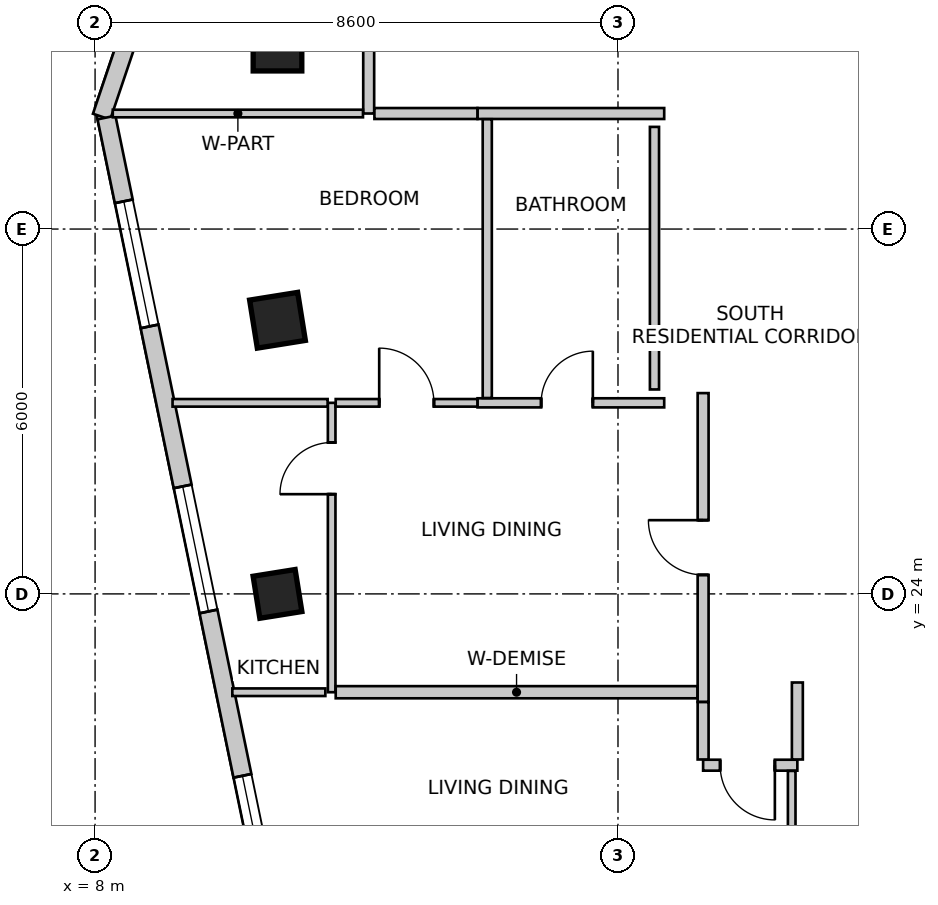
"""IFC4 building model, lengths in metres.
Left out: names, types, materials, properties, quantities, classifications, styles, units other than length and angle.
Written with IfcOpenShell. Run it as: python <this file> out.ifc"""

import sys

from ifc_helpers import new_model, si_unit, direction, frame, frame_2d, origin, origin_2d, place, context, subcontext, project, spatial, rectangle, extrude, source, transform, mapped, element, fill, save


model = new_model("IFC4")
c1 = context("Model", 3, precision=1e-05, world=origin(), true_north=direction((0.0, 1.0)))
c2 = subcontext(c1, "Body", "Model", "MODEL_VIEW")
j1 = project(units=[si_unit("LENGTHUNIT", "METRE"), si_unit("PLANEANGLEUNIT", "RADIAN")], contexts=[c1])
p1 = place(None, origin())
s1 = spatial("IfcSite", under=j1, at=p1, CompositionType="ELEMENT")
p2 = place(p1, origin())
s2 = spatial("IfcBuilding", under=s1, at=p2, CompositionType="ELEMENT")
p3 = place(p2, frame((0.0, 0.0, 214.9)))
s3 = spatial("IfcBuildingStorey", under=s2, at=p3, CompositionType="ELEMENT", Elevation=214.9)
m1 = source(origin(), c2, "Body", "SweptSolid", [
    extrude(rectangle(XDim=0.8, YDim=0.8, at=origin_2d()), origin(), (0.0, 0.0, 1.0), 3.5),
])
for number, where, z_axis, x_axis in (
    (1, (11.0, 33.0, 0.0), (0.0, 0.0, 1.0), (1.0, 0.0, 0.0)),
    (2, (11.0, 28.5, 0.0), (0.0, 0.0, 1.0), (0.158, -0.987, 0.0)),
):
    element("IfcColumn", number, at=place(p3, frame(where, z_axis=z_axis, x_axis=x_axis)), inside=s3, PredefinedType="COLUMN", context=c2, shape_type="MappedRepresentation", body=[
        mapped(m1, transform((0.0, 0.0, 0.0), scale=1.0)),
    ])
m2 = source(origin(), c2, "Body", "SweptSolid", [
    extrude(rectangle(XDim=0.7, YDim=0.7, at=origin_2d()), origin(), (0.0, 0.0, 1.0), 3.5),
])
p4 = place(p3, frame((11.0, 24.0, 0.0), z_axis=(0.0, 0.0, 1.0), x_axis=(0.158158067254, -0.987413806751, 0.0)))
e3 = element("IfcColumn", 3, at=p4, inside=s3, PredefinedType="COLUMN", context=c2, shape_type="MappedRepresentation", body=[
    mapped(m2, transform((0.0, 0.0, 0.0), scale=1.0)),
])
p5 = place(p3, frame((13.269, 47.134, 0.0), z_axis=(0.0, 0.0, 1.0), x_axis=(-0.319920776449, -0.947444297464, 0.0)))
e4 = element("IfcWall", 4, at=p5, inside=s3, PredefinedType="SOLIDWALL", context=c2, shape_type="SweptSolid", body=[
    extrude(rectangle(XDim=16.133, YDim=0.3, at=frame_2d((8.067, 0.0))), origin(), (0.0, 0.0, 1.0), 3.25),
])
m3 = source(origin(), c2, "Body", "SweptSolid", [
    extrude(rectangle(XDim=2.4, YDim=2.2, at=frame_2d((1.2, 1.1))), frame((0.0, 0.16, 0.0), z_axis=(0.0, -1.0, 0.0), x_axis=(1.0, 0.0, 0.0)), (0.0, 0.0, 1.0), 0.32),
])
p6 = place(p5, frame((2.363, 0.0, 0.85)))
e5 = element("IfcOpeningElement", 5, at=p6, cuts=e4, PredefinedType="OPENING", context=c2, shape_type="MappedRepresentation", body=[
    mapped(m3, transform((0.0, 0.0, 0.0), scale=1.0)),
])
m4 = source(origin(), c2, "Body", "SweptSolid", [
    extrude(rectangle(XDim=2.1, YDim=2.0, at=frame_2d((1.05, 1.0))), frame((0.0, 0.16, 0.0), z_axis=(0.0, -1.0, 0.0), x_axis=(1.0, 0.0, 0.0)), (0.0, 0.0, 1.0), 0.32),
])
p7 = place(p5, frame((7.41, 0.0, 0.85)))
e6 = element("IfcOpeningElement", 6, at=p7, cuts=e4, PredefinedType="OPENING", context=c2, shape_type="MappedRepresentation", body=[
    mapped(m4, transform((0.0, 0.0, 0.0), scale=1.0)),
])
p8 = place(p5, frame((12.157, 0.0, 0.85)))
e7 = element("IfcOpeningElement", 7, at=p8, cuts=e4, PredefinedType="OPENING", context=c2, shape_type="MappedRepresentation", body=[
    mapped(m3, transform((0.0, 0.0, 0.0), scale=1.0)),
])
p9 = place(p3, frame((8.188, 31.834, 0.0), z_axis=(0.0, 0.0, 1.0), x_axis=(0.202303475707, -0.979322880217, 0.0)))
e8 = element("IfcWall", 8, at=p9, inside=s3, PredefinedType="SOLIDWALL", context=c2, shape_type="SweptSolid", body=[
    extrude(rectangle(XDim=15.766, YDim=0.3, at=frame_2d((7.883, 0.0))), origin(), (0.0, 0.0, 1.0), 3.25),
])
p10 = place(p9, frame((1.407, 0.0, 0.85)))
e9 = element("IfcOpeningElement", 9, at=p10, cuts=e8, PredefinedType="OPENING", context=c2, shape_type="MappedRepresentation", body=[
    mapped(m4, transform((0.0, 0.0, 0.0), scale=1.0)),
])
p11 = place(p9, frame((6.194, 0.0, 0.85)))
e10 = element("IfcOpeningElement", 10, at=p11, cuts=e8, PredefinedType="OPENING", context=c2, shape_type="MappedRepresentation", body=[
    mapped(m4, transform((0.0, 0.0, 0.0), scale=1.0)),
])
p12 = place(p9, frame((11.054, 0.0, 0.85)))
e11 = element("IfcOpeningElement", 11, at=p12, cuts=e8, PredefinedType="OPENING", context=c2, shape_type="MappedRepresentation", body=[
    mapped(m4, transform((0.0, 0.0, 0.0), scale=1.0)),
])
p13 = place(p3, frame((12.5, 31.9, 0.0), z_axis=(0.0, 0.0, 1.0), x_axis=(0.0, 1.0, 0.0)))
e12 = element("IfcWall", 12, at=p13, inside=s3, PredefinedType="PARTITIONING", context=c2, shape_type="SweptSolid", body=[
    extrude(rectangle(XDim=1.556, YDim=0.18, at=frame_2d((0.778, 0.0))), origin(), (0.0, 0.0, 1.0), 2.835),
])
p14 = place(p3, frame((17.36, 31.9, 0.0), z_axis=(0.0, 0.0, 1.0), x_axis=(-1.0, 0.0, 0.0)))
e13 = element("IfcWall", 13, at=p14, inside=s3, PredefinedType="PARTITIONING", context=c2, shape_type="SweptSolid", body=[
    extrude(rectangle(XDim=3.07, YDim=0.18, at=frame_2d((1.535, 0.0))), origin(), (0.0, 0.0, 1.0), 2.835),
])
p15 = place(p3, frame((14.288, 31.9, 0.0), z_axis=(0.0, 0.0, 1.0), x_axis=(-1.0, 0.0, 0.0)))
e14 = element("IfcWall", 14, at=p15, inside=s3, PredefinedType="PARTITIONING", context=c2, shape_type="SweptSolid", body=[
    extrude(rectangle(XDim=1.694, YDim=0.18, at=frame_2d((0.847, 0.0))), origin(), (0.0, 0.0, 1.0), 2.835),
])
p16 = place(p3, frame((12.406, 31.9, 0.0), z_axis=(0.0, 0.0, 1.0), x_axis=(-1.0, 0.0, 0.0)))
e15 = element("IfcWall", 15, at=p16, inside=s3, PredefinedType="PARTITIONING", context=c2, shape_type="SweptSolid", body=[
    extrude(rectangle(XDim=4.115, YDim=0.125, at=frame_2d((2.057, 0.0))), origin(), (0.0, 0.0, 1.0), 2.542),
])
p17 = place(p3, frame((18.0, 22.223, 0.0), z_axis=(0.0, 0.0, 1.0), x_axis=(0.0, 1.0, 0.0)))
e16 = element("IfcWall", 16, at=p17, inside=s3, PredefinedType="PARTITIONING", context=c2, shape_type="SweptSolid", body=[
    extrude(rectangle(XDim=5.079, YDim=0.18, at=frame_2d((2.54, 0.0))), origin(), (0.0, 0.0, 1.0), 2.688),
])
m5 = source(origin(), c2, "Body", "SweptSolid", [
    extrude(rectangle(XDim=0.9, YDim=2.15, at=frame_2d((0.45, 1.075))), frame((0.0, 0.1, 0.0), z_axis=(0.0, -1.0, 0.0), x_axis=(1.0, 0.0, 0.0)), (0.0, 0.0, 1.0), 0.2),
])
p18 = place(p17, frame((2.09, 0.0, 0.0)))
e17 = element("IfcOpeningElement", 17, at=p18, cuts=e16, PredefinedType="OPENING", context=c2, shape_type="MappedRepresentation", body=[
    mapped(m5, transform((0.0, 0.0, 0.0), scale=1.0)),
])
p19 = place(p3, frame((19.55, 21.183, 0.0), z_axis=(0.0, 0.0, 1.0), x_axis=(-1.0, 0.0, 0.0)))
e18 = element("IfcWall", 18, at=p19, inside=s3, PredefinedType="PARTITIONING", context=c2, shape_type="SweptSolid", body=[
    extrude(rectangle(XDim=1.55, YDim=0.18, at=frame_2d((0.775, 0.0))), origin(), (0.0, 0.0, 1.0), 2.688),
])
p20 = place(p19, frame((0.37, 0.0, 0.0)))
e19 = element("IfcOpeningElement", 19, at=p20, cuts=e18, PredefinedType="OPENING", context=c2, shape_type="MappedRepresentation", body=[
    mapped(m5, transform((0.0, 0.0, 0.0), scale=1.0)),
])
p21 = place(p3, frame((18.0, 21.277, 0.0), z_axis=(0.0, 0.0, 1.0), x_axis=(0.0, 1.0, 0.0)))
e20 = element("IfcWall", 20, at=p21, inside=s3, PredefinedType="PARTITIONING", context=c2, shape_type="SweptSolid", body=[
    extrude(rectangle(XDim=0.944, YDim=0.18, at=frame_2d((0.472, 0.0))), origin(), (0.0, 0.0, 1.0), 2.688),
])
p22 = place(p3, frame((19.55, 22.543, 0.0), z_axis=(0.0, 0.0, 1.0), x_axis=(0.0, -1.0, 0.0)))
e21 = element("IfcWall", 21, at=p22, inside=s3, PredefinedType="PARTITIONING", context=c2, shape_type="SweptSolid", body=[
    extrude(rectangle(XDim=1.266, YDim=0.18, at=frame_2d((0.633, 0.0))), origin(), (0.0, 0.0, 1.0), 3.25),
])
p23 = place(p3, frame((11.891, 22.383, 0.0), z_axis=(0.0, 0.0, 1.0), x_axis=(0.0, 1.0, 0.0)))
e22 = element("IfcWall", 22, at=p23, inside=s3, PredefinedType="PARTITIONING", context=c2, shape_type="SweptSolid", body=[
    extrude(rectangle(XDim=4.759, YDim=0.125, at=frame_2d((2.379, 0.0))), origin(), (0.0, 0.0, 1.0), 2.688),
])
m6 = source(origin(), c2, "Body", "SweptSolid", [
    extrude(rectangle(XDim=0.85, YDim=2.15, at=frame_2d((0.425, 1.075))), frame((0.0, 0.073, 0.0), z_axis=(0.0, -1.0, 0.0), x_axis=(1.0, 0.0, 0.0)), (0.0, 0.0, 1.0), 0.145),
])
p24 = place(p23, frame((3.257, 0.0, 0.0)))
e23 = element("IfcOpeningElement", 23, at=p24, cuts=e22, PredefinedType="OPENING", context=c2, shape_type="MappedRepresentation", body=[
    mapped(m6, transform((0.0, 0.0, 0.0), scale=1.0)),
])
p25 = place(p3, frame((14.29, 27.142, 0.0), z_axis=(0.0, 0.0, 1.0), x_axis=(1.0, 0.0, 0.0)))
e24 = element("IfcWall", 24, at=p25, inside=s3, PredefinedType="PARTITIONING", context=c2, shape_type="SweptSolid", body=[
    extrude(rectangle(XDim=3.07, YDim=0.15, at=frame_2d((1.535, 0.0))), origin(), (0.0, 0.0, 1.0), 2.835),
])
m7 = source(origin(), c2, "Body", "SweptSolid", [
    extrude(rectangle(XDim=0.85, YDim=2.15, at=frame_2d((0.425, 1.075))), frame((0.0, 0.085, 0.0), z_axis=(0.0, -1.0, 0.0), x_axis=(1.0, 0.0, 0.0)), (0.0, 0.0, 1.0), 0.17),
])
p26 = place(p25, frame((1.046, 0.0, 0.0)))
e25 = element("IfcOpeningElement", 25, at=p26, cuts=e24, PredefinedType="OPENING", context=c2, shape_type="MappedRepresentation", body=[
    mapped(m7, transform((0.0, 0.0, 0.0), scale=1.0)),
])
p27 = place(p3, frame((11.958, 27.142, 0.0), z_axis=(0.0, 0.0, 1.0), x_axis=(1.0, 0.0, 0.0)))
e26 = element("IfcWall", 26, at=p27, inside=s3, PredefinedType="PARTITIONING", context=c2, shape_type="SweptSolid", body=[
    extrude(rectangle(XDim=2.331, YDim=0.125, at=frame_2d((1.165, 0.0))), origin(), (0.0, 0.0, 1.0), 3.25),
])
m8 = source(origin(), c2, "Body", "SweptSolid", [
    extrude(rectangle(XDim=0.9, YDim=2.15, at=frame_2d((0.45, 1.075))), frame((0.0, 0.073, 0.0), z_axis=(0.0, -1.0, 0.0), x_axis=(1.0, 0.0, 0.0)), (0.0, 0.0, 1.0), 0.145),
])
p28 = place(p27, frame((0.715, 0.0, 0.0)))
e27 = element("IfcOpeningElement", 27, at=p28, cuts=e26, PredefinedType="OPENING", context=c2, shape_type="MappedRepresentation", body=[
    mapped(m8, transform((0.0, 0.0, 0.0), scale=1.0)),
])
p29 = place(p3, frame((17.906, 22.383, 0.0), z_axis=(0.0, 0.0, 1.0), x_axis=(-1.0, 0.0, 0.0)))
e28 = element("IfcWall", 28, at=p29, inside=s3, PredefinedType="PARTITIONING", context=c2, shape_type="SweptSolid", body=[
    extrude(rectangle(XDim=5.948, YDim=0.2, at=frame_2d((2.974, 0.0))), origin(), (0.0, 0.0, 1.0), 2.688),
])
p30 = place(p3, frame((9.274, 27.142, 0.0), z_axis=(0.0, 0.0, 1.0), x_axis=(1.0, 0.0, 0.0)))
e29 = element("IfcWall", 29, at=p30, inside=s3, PredefinedType="PARTITIONING", context=c2, shape_type="SweptSolid", body=[
    extrude(rectangle(XDim=2.55, YDim=0.125, at=frame_2d((1.275, 0.0))), origin(), (0.0, 0.0, 1.0), 2.542),
])
p31 = place(p3, frame((11.787, 22.383, 0.0), z_axis=(0.0, 0.0, 1.0), x_axis=(-1.0, 0.0, 0.0)))
e30 = element("IfcWall", 30, at=p31, inside=s3, PredefinedType="PARTITIONING", context=c2, shape_type="SweptSolid", body=[
    extrude(rectangle(XDim=1.53, YDim=0.125, at=frame_2d((0.765, 0.0))), origin(), (0.0, 0.0, 1.0), 3.25),
])
p32 = place(p3, frame((14.45, 27.221, 0.0), z_axis=(0.0, 0.0, 1.0), x_axis=(0.0, 1.0, 0.0)))
e31 = element("IfcWall", 31, at=p32, inside=s3, PredefinedType="PARTITIONING", context=c2, shape_type="SweptSolid", body=[
    extrude(rectangle(XDim=4.585, YDim=0.15, at=frame_2d((2.292, 0.0))), origin(), (0.0, 0.0, 1.0), 2.766),
])
p33 = place(p3, frame((19.457, 21.089, 0.0), z_axis=(0.0, 0.0, 1.0), x_axis=(0.0, -1.0, 0.0)))
e32 = element("IfcWall", 32, at=p33, inside=s3, PredefinedType="PARTITIONING", context=c2, shape_type="SweptSolid", body=[
    extrude(rectangle(XDim=3.465, YDim=0.125, at=frame_2d((1.732, 0.0))), origin(), (0.0, 0.0, 1.0), 2.688),
])
p34 = place(p33, frame((1.247, 0.0, 0.0)))
e33 = element("IfcOpeningElement", 33, at=p34, cuts=e32, PredefinedType="OPENING", context=c2, shape_type="MappedRepresentation", body=[
    mapped(m6, transform((0.0, 0.0, 0.0), scale=1.0)),
])
p35 = place(p3, frame((17.2, 31.68, 0.0), z_axis=(0.0, 0.0, 1.0), x_axis=(0.0, -1.0, 0.0)))
e34 = element("IfcWall", 34, at=p35, inside=s3, PredefinedType="PARTITIONING", context=c2, shape_type="SweptSolid", body=[
    extrude(rectangle(XDim=4.318, YDim=0.15, at=frame_2d((2.159, 0.0))), origin(), (0.0, 0.0, 1.0), 2.766),
])
m9 = source(origin(), c2, "Body", "SweptSolid", [
    extrude(rectangle(XDim=2.1, YDim=2.0, at=frame_2d((1.05, 1.0))), frame((0.0, -0.015, 0.0), z_axis=(0.0, -1.0, 0.0), x_axis=(1.0, 0.0, 0.0)), (0.0, 0.0, 1.0), 0.06),
])
p36 = place(p10, origin())
e35 = element("IfcWindow", 35, at=p36, inside=s3, PartitioningType="SINGLE_PANEL", PredefinedType="WINDOW", context=c2, shape_type="MappedRepresentation", body=[
    mapped(m9, transform((0.0, 0.0, 0.0), scale=1.0)),
])
fill(e9, e35)
p37 = place(p11, origin())
e36 = element("IfcWindow", 36, at=p37, inside=s3, PartitioningType="SINGLE_PANEL", PredefinedType="WINDOW", context=c2, shape_type="MappedRepresentation", body=[
    mapped(m9, transform((0.0, 0.0, 0.0), scale=1.0)),
])
fill(e10, e36)
p38 = place(p12, origin())
e37 = element("IfcWindow", 37, at=p38, inside=s3, PartitioningType="SINGLE_PANEL", PredefinedType="WINDOW", context=c2, shape_type="MappedRepresentation", body=[
    mapped(m9, transform((0.0, 0.0, 0.0), scale=1.0)),
])
fill(e11, e37)
m10 = source(origin(), c2, "Body", "SweptSolid", [
    extrude(rectangle(XDim=0.9, YDim=2.15, at=frame_2d((0.45, 1.075))), frame((0.0, 0.025, 0.0), z_axis=(0.0, -1.0, 0.0), x_axis=(1.0, 0.0, 0.0)), (0.0, 0.0, 1.0), 0.05),
])
p39 = place(p18, origin())
e38 = element("IfcDoor", 38, at=p39, inside=s3, OperationType="SINGLE_SWING_RIGHT", PredefinedType="DOOR", context=c2, shape_type="MappedRepresentation", body=[
    mapped(m10, transform((0.0, 0.0, 0.0), scale=1.0)),
])
fill(e17, e38)
m11 = source(origin(), c2, "Body", "SweptSolid", [
    extrude(rectangle(XDim=0.85, YDim=2.15, at=frame_2d((0.425, 1.075))), frame((0.0, 0.025, 0.0), z_axis=(0.0, -1.0, 0.0), x_axis=(1.0, 0.0, 0.0)), (0.0, 0.0, 1.0), 0.05),
])
p40 = place(p24, origin())
e39 = element("IfcDoor", 39, at=p40, inside=s3, OperationType="SINGLE_SWING_LEFT", PredefinedType="DOOR", context=c2, shape_type="MappedRepresentation", body=[
    mapped(m11, transform((0.0, 0.0, 0.0), scale=1.0)),
])
fill(e23, e39)
p41 = place(p26, origin())
e40 = element("IfcDoor", 40, at=p41, inside=s3, OperationType="SINGLE_SWING_RIGHT", PredefinedType="DOOR", context=c2, shape_type="MappedRepresentation", body=[
    mapped(m11, transform((0.0, 0.0, 0.0), scale=1.0)),
])
fill(e25, e40)
m12 = source(origin(), c2, "Body", "SweptSolid", [
    extrude(rectangle(XDim=0.9, YDim=2.15, at=frame_2d((0.45, 1.075))), frame((0.0, 0.025, 0.0), z_axis=(0.0, -1.0, 0.0), x_axis=(1.0, 0.0, 0.0)), (0.0, 0.0, 1.0), 0.05),
])
p42 = place(p28, origin())
e41 = element("IfcDoor", 41, at=p42, inside=s3, OperationType="SINGLE_SWING_LEFT", PredefinedType="DOOR", context=c2, shape_type="MappedRepresentation", body=[
    mapped(m12, transform((0.0, 0.0, 0.0), scale=1.0)),
])
fill(e27, e41)
p43 = place(p20, origin())
e42 = element("IfcDoor", 42, at=p43, inside=s3, OperationType="SINGLE_SWING_LEFT", PredefinedType="DOOR", context=c2, shape_type="MappedRepresentation", body=[
    mapped(m10, transform((0.0, 0.0, 0.0), scale=1.0)),
])
fill(e19, e42)
save(model, sys.argv[1])
